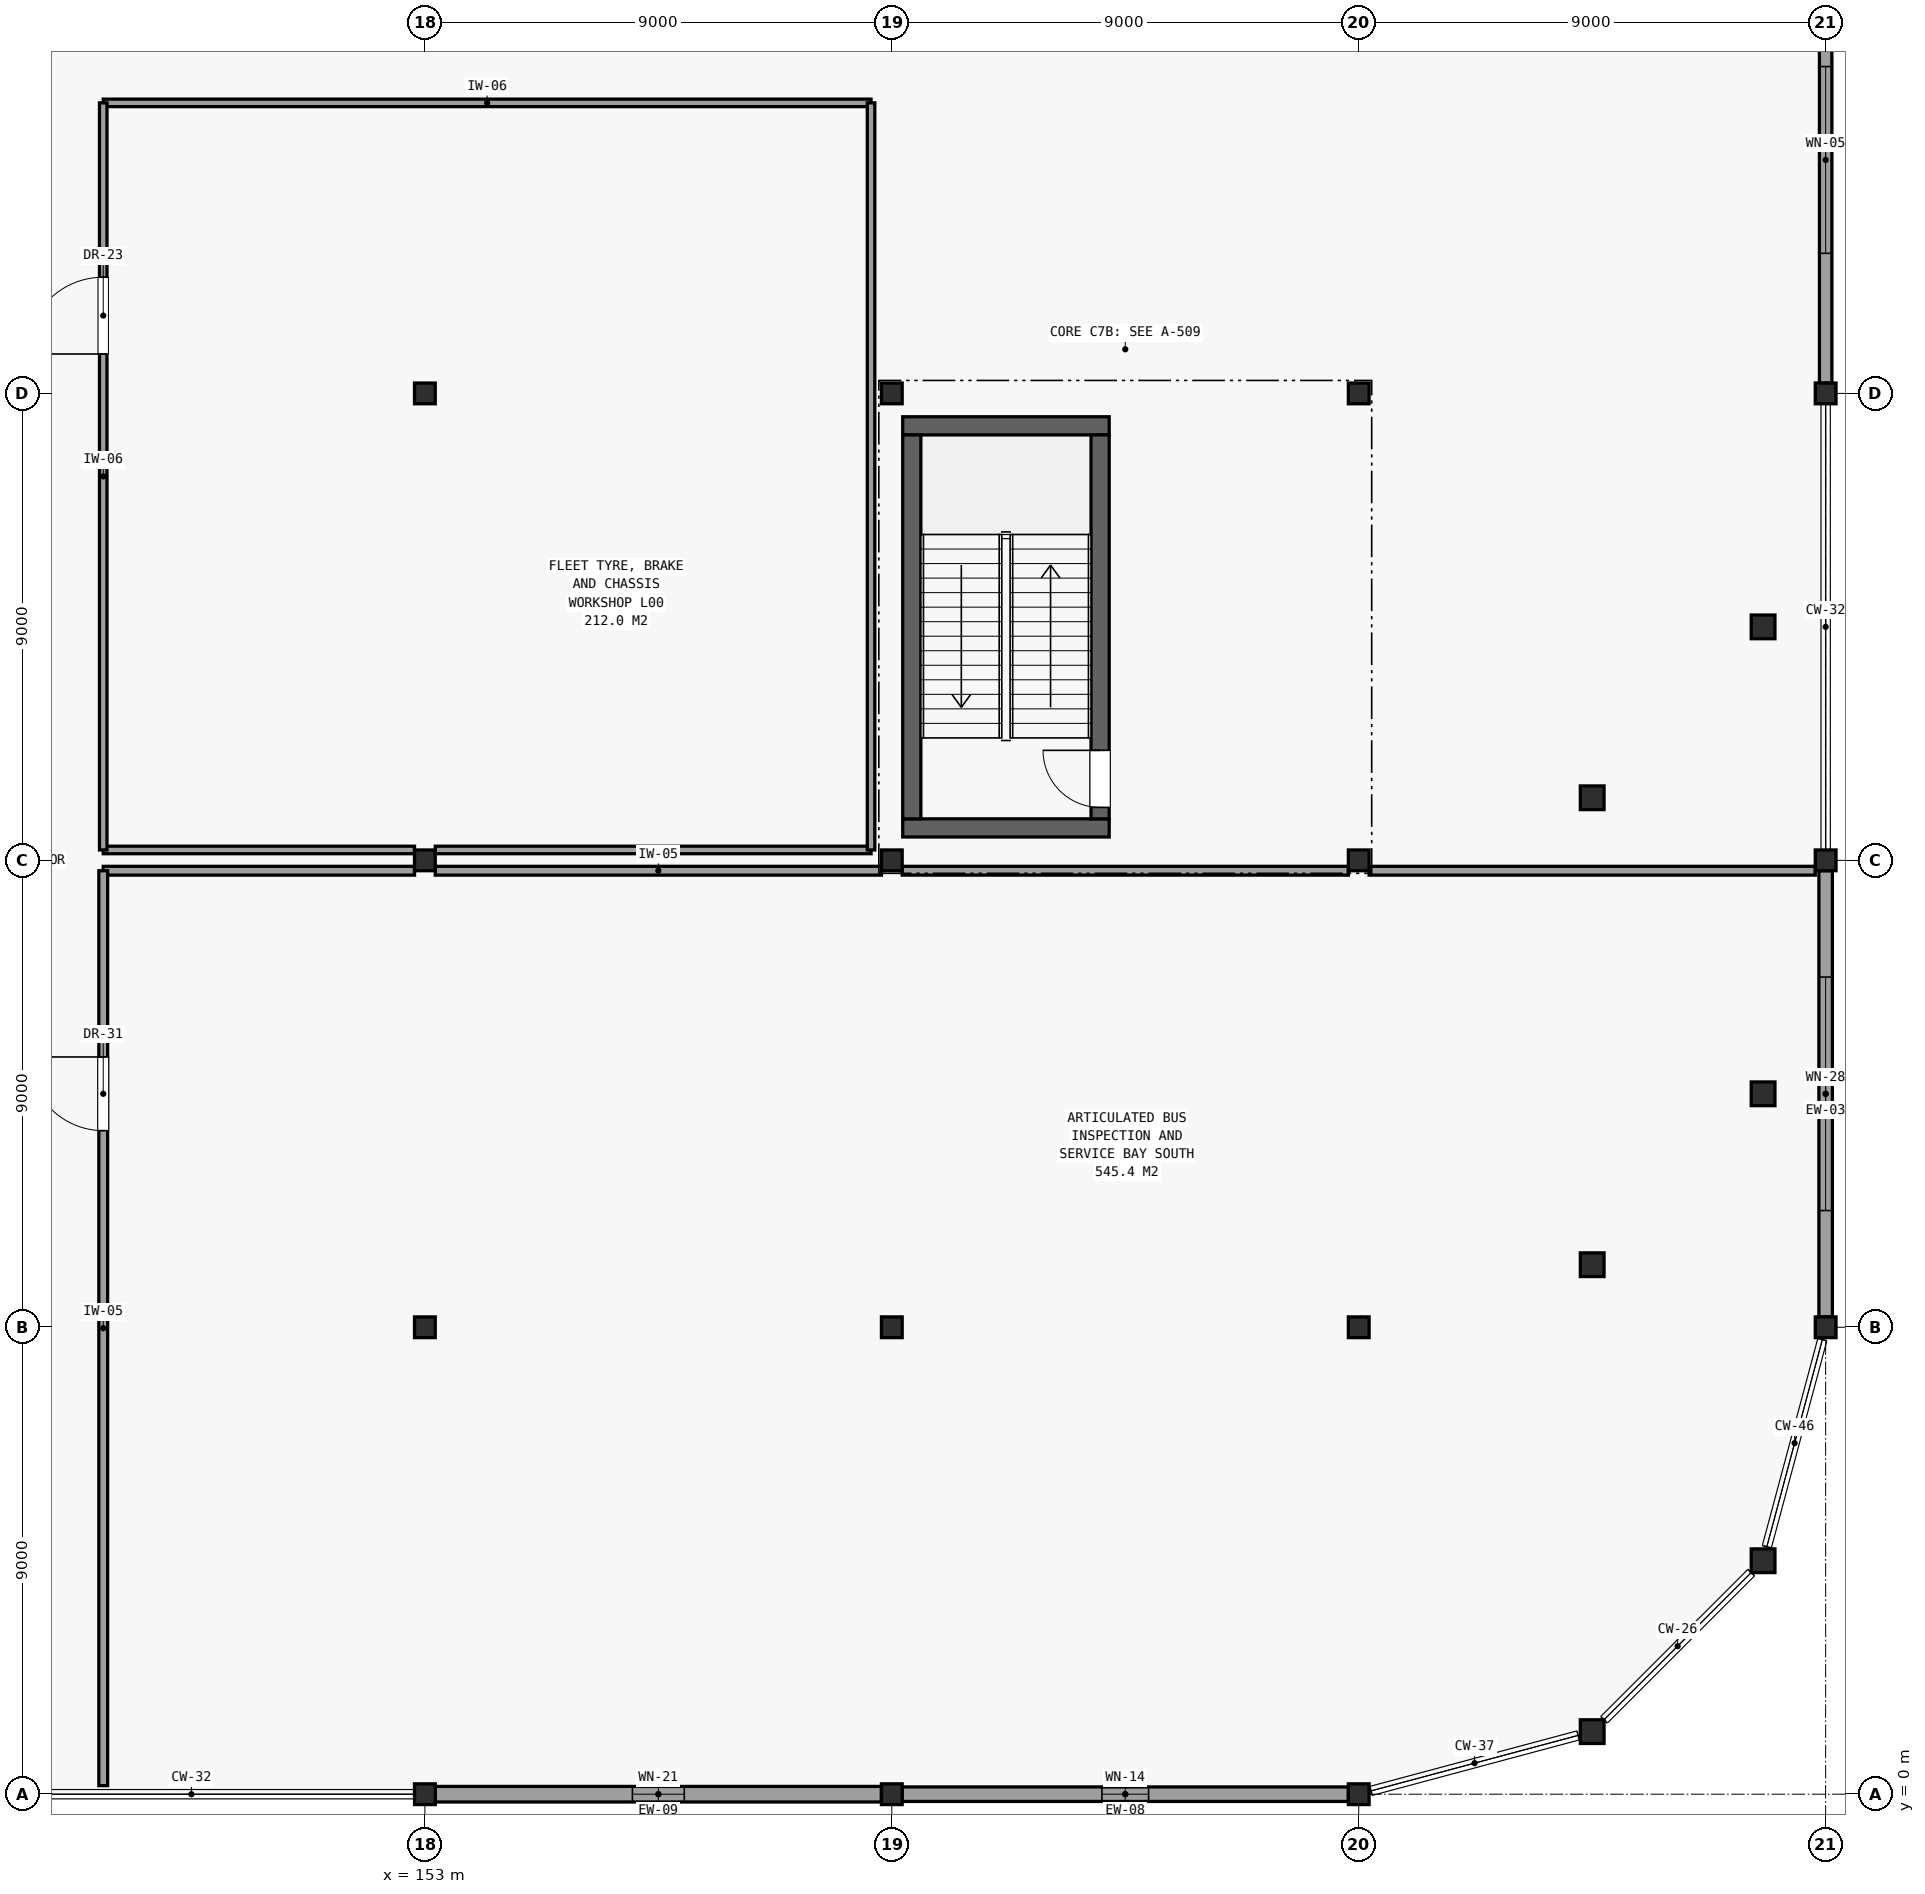
"""IFC4 building model, lengths in metres.
Left out: names, types, materials, properties, quantities, classifications, styles, units other than length and angle.
Written with IfcOpenShell. Run it as: python <this file> out.ifc"""

import sys

from ifc_helpers import new_model, si_unit, direction, frame, frame_2d, origin, origin_2d, place, context, subcontext, project, spatial, rectangle, hollow_rectangle, hollow_circle, extrude, element, fill, save


model = new_model("IFC4")
c1 = context("Model", 3, precision=1e-05, world=origin(), true_north=direction((0.0, 1.0)))
c2 = subcontext(c1, "Body", "Model", "MODEL_VIEW")
j1 = project(units=[si_unit("LENGTHUNIT", "METRE"), si_unit("PLANEANGLEUNIT", "RADIAN")], contexts=[c1])
p1 = place(None, origin())
s1 = spatial("IfcSite", under=j1, at=p1, CompositionType="ELEMENT")
p2 = place(p1, origin())
s2 = spatial("IfcBuilding", under=s1, at=p2, CompositionType="ELEMENT")
p3 = place(p2, origin())
s3 = spatial("IfcBuildingStorey", under=s2, at=p3, CompositionType="ELEMENT", Elevation=0.0)
for number, where, z_axis, x_axis in (
    (1, (153.0, 0.0, 0.0), (0.0, 0.0, 1.0), (1.0, 0.0, 0.0)),
    (2, (153.0, 9.0, 0.0), (0.0, 0.0, 1.0), (1.0, 0.0, 0.0)),
    (3, (153.0, 18.0, 0.0), (0.0, 0.0, 1.0), (1.0, 0.0, 0.0)),
    (4, (153.0, 27.0, 0.0), (0.0, 0.0, 1.0), (1.0, 0.0, 0.0)),
    (5, (162.0, 0.0, 0.0), (0.0, 0.0, 1.0), (1.0, 0.0, 0.0)),
    (6, (162.0, 9.0, 0.0), (0.0, 0.0, 1.0), (1.0, 0.0, 0.0)),
    (7, (162.0, 18.0, 0.0), (0.0, 0.0, 1.0), (1.0, 0.0, 0.0)),
    (8, (162.0, 27.0, 0.0), (0.0, 0.0, 1.0), (1.0, 0.0, 0.0)),
    (9, (171.0, 0.0, 0.0), (0.0, 0.0, 1.0), (1.0, 0.0, 0.0)),
    (10, (171.0, 9.0, 0.0), (0.0, 0.0, 1.0), (1.0, 0.0, 0.0)),
    (11, (171.0, 18.0, 0.0), (0.0, 0.0, 1.0), (1.0, 0.0, 0.0)),
    (12, (171.0, 27.0, 0.0), (0.0, 0.0, 1.0), (1.0, 0.0, 0.0)),
):
    element("IfcColumn", number, at=place(p3, frame(where, z_axis=z_axis, x_axis=x_axis)), inside=s3, PredefinedType="COLUMN", context=c2, shape_type="SweptSolid", body=[
        extrude(hollow_rectangle(XDim=0.4, YDim=0.4, WallThickness=0.019, at=origin_2d()), origin(), (0.0, 0.0, 1.0), 5.1),
    ])
for number, where, z_axis, x_axis in (
    (13, (175.5, 1.206, 0.0), (0.0, 0.0, 1.0), (1.0, 0.0, 0.0)),
    (14, (175.5, 10.206, 0.0), (0.0, 0.0, 1.0), (1.0, 0.0, 0.0)),
    (15, (175.5, 19.206, 0.0), (0.0, 0.0, 1.0), (1.0, 0.0, 0.0)),
    (16, (178.794, 4.5, 0.0), (0.0, 0.0, 1.0), (1.0, 0.0, 0.0)),
    (17, (178.794, 13.5, 0.0), (0.0, 0.0, 1.0), (1.0, 0.0, 0.0)),
    (18, (178.794, 22.5, 0.0), (0.0, 0.0, 1.0), (1.0, 0.0, 0.0)),
):
    element("IfcColumn", number, at=place(p3, frame(where, z_axis=z_axis, x_axis=x_axis)), inside=s3, PredefinedType="COLUMN", context=c2, shape_type="SweptSolid", body=[
        extrude(hollow_circle(Radius=0.229, WallThickness=0.016, at=origin_2d()), origin(), (0.0, 0.0, 1.0), 5.1),
    ])
for number, where, z_axis, x_axis in (
    (19, (180.0, 9.0, 0.0), (0.0, 0.0, 1.0), (1.0, 0.0, 0.0)),
    (20, (180.0, 18.0, 0.0), (0.0, 0.0, 1.0), (1.0, 0.0, 0.0)),
    (21, (180.0, 27.0, 0.0), (0.0, 0.0, 1.0), (1.0, 0.0, 0.0)),
):
    element("IfcColumn", number, at=place(p3, frame(where, z_axis=z_axis, x_axis=x_axis)), inside=s3, PredefinedType="COLUMN", context=c2, shape_type="SweptSolid", body=[
        extrude(hollow_rectangle(XDim=0.4, YDim=0.4, WallThickness=0.019, at=origin_2d()), origin(), (0.0, 0.0, 1.0), 5.1),
    ])
p4 = place(p3, frame((153.2, 0.0, 0.0), z_axis=(0.0, 0.0, 1.0), x_axis=(1.0, 0.0, 0.0)))
e22 = element("IfcWall", 22, at=p4, inside=s3, PredefinedType="SOLIDWALL", context=c2, shape_type="SweptSolid", body=[
    extrude(rectangle(XDim=8.6, YDim=0.3, at=frame_2d((4.3, 0.0))), origin(), (0.0, 0.0, 1.0), 4.19),
])
p5 = place(p4, frame((3.8, 0.0, 0.95)))
e23 = element("IfcOpeningElement", 23, at=p5, cuts=e22, PredefinedType="OPENING", context=c2, shape_type="SweptSolid", body=[
    extrude(rectangle(XDim=1.0, YDim=1.4, at=frame_2d((0.5, 0.7))), frame((0.0, 0.161, 0.0), z_axis=(0.0, -1.0, 0.0), x_axis=(1.0, 0.0, 0.0)), (0.0, 0.0, 1.0), 0.322),
])
p6 = place(p3, frame((162.2, 0.0, 0.0), z_axis=(0.0, 0.0, 1.0), x_axis=(1.0, 0.0, 0.0)))
e24 = element("IfcWall", 24, at=p6, inside=s3, PredefinedType="SOLIDWALL", context=c2, shape_type="SweptSolid", body=[
    extrude(rectangle(XDim=8.6, YDim=0.28, at=frame_2d((4.3, 0.0))), origin(), (0.0, 0.0, 1.0), 4.19),
])
p7 = place(p6, frame((3.85, 0.0, 0.95)))
e25 = element("IfcOpeningElement", 25, at=p7, cuts=e24, PredefinedType="OPENING", context=c2, shape_type="SweptSolid", body=[
    extrude(rectangle(XDim=0.9, YDim=1.3, at=frame_2d((0.45, 0.65))), frame((0.0, 0.151, 0.0), z_axis=(0.0, -1.0, 0.0), x_axis=(1.0, 0.0, 0.0)), (0.0, 0.0, 1.0), 0.302),
])
p8 = place(p3, frame((180.0, 9.2, 0.0), z_axis=(0.0, 0.0, 1.0), x_axis=(0.0, 1.0, 0.0)))
e26 = element("IfcWall", 26, at=p8, inside=s3, PredefinedType="SOLIDWALL", context=c2, shape_type="SweptSolid", body=[
    extrude(rectangle(XDim=8.6, YDim=0.26, at=frame_2d((4.3, 0.0))), origin(), (0.0, 0.0, 1.0), 4.19),
])
p9 = place(p8, frame((2.05, 0.0, 0.95)))
e27 = element("IfcOpeningElement", 27, at=p9, cuts=e26, PredefinedType="OPENING", context=c2, shape_type="SweptSolid", body=[
    extrude(rectangle(XDim=4.5, YDim=1.2, at=frame_2d((2.25, 0.6))), frame((0.0, 0.141, 0.0), z_axis=(0.0, -1.0, 0.0), x_axis=(1.0, 0.0, 0.0)), (0.0, 0.0, 1.0), 0.282),
])
p10 = place(p3, frame((180.0, 27.2, 0.0), z_axis=(0.0, 0.0, 1.0), x_axis=(0.0, 1.0, 0.0)))
e28 = element("IfcWall", 28, at=p10, inside=s3, PredefinedType="SOLIDWALL", context=c2, shape_type="SweptSolid", body=[
    extrude(rectangle(XDim=8.6, YDim=0.24, at=frame_2d((4.3, 0.0))), origin(), (0.0, 0.0, 1.0), 4.19),
])
p11 = place(p10, frame((2.5, 0.0, 0.95)))
e29 = element("IfcOpeningElement", 29, at=p11, cuts=e28, PredefinedType="OPENING", context=c2, shape_type="SweptSolid", body=[
    extrude(rectangle(XDim=3.6, YDim=1.1, at=frame_2d((1.8, 0.55))), frame((0.0, 0.131, 0.0), z_axis=(0.0, -1.0, 0.0), x_axis=(1.0, 0.0, 0.0)), (0.0, 0.0, 1.0), 0.262),
])
for number, where, z_axis, x_axis in (
    (30, (162.21, 18.625, 0.0), (0.0, 0.0, 1.0), (1.0, 0.0, 0.0)),
    (31, (162.21, 26.375, 0.0), (0.0, 0.0, 1.0), (1.0, 0.0, 0.0)),
):
    element("IfcWall", number, at=place(p3, frame(where, z_axis=z_axis, x_axis=x_axis)), inside=s3, PredefinedType="SHEAR", context=c2, shape_type="SweptSolid", body=[
        extrude(rectangle(XDim=3.98, YDim=0.35, at=frame_2d((1.99, 0.0))), origin(), (0.0, 0.0, 1.0), 4.84),
    ])
p12 = place(p3, frame((162.385, 18.8, 0.0), z_axis=(0.0, 0.0, 1.0), x_axis=(0.0, 1.0, 0.0)))
e32 = element("IfcWall", 32, at=p12, inside=s3, PredefinedType="SHEAR", context=c2, shape_type="SweptSolid", body=[
    extrude(rectangle(XDim=7.4, YDim=0.35, at=frame_2d((3.7, 0.0))), origin(), (0.0, 0.0, 1.0), 4.84),
])
p13 = place(p3, frame((166.015, 18.8, 0.0), z_axis=(0.0, 0.0, 1.0), x_axis=(0.0, 1.0, 0.0)))
e33 = element("IfcWall", 33, at=p13, inside=s3, PredefinedType="SHEAR", context=c2, shape_type="SweptSolid", body=[
    extrude(rectangle(XDim=7.4, YDim=0.35, at=frame_2d((3.7, 0.0))), origin(), (0.0, 0.0, 1.0), 4.84),
])
p14 = place(p13, frame((0.22, 0.0, 0.0)))
e34 = element("IfcOpeningElement", 34, at=p14, cuts=e33, PredefinedType="OPENING", context=c2, shape_type="SweptSolid", body=[
    extrude(rectangle(XDim=1.1, YDim=2.15, at=frame_2d((0.55, 1.075))), frame((0.0, 0.186, 0.0), z_axis=(0.0, -1.0, 0.0), x_axis=(1.0, 0.0, 0.0)), (0.0, 0.0, 1.0), 0.372),
])
p15 = place(p3, frame((146.8, 17.8, 0.0), z_axis=(0.0, 0.0, 1.0), x_axis=(1.0, 0.0, 0.0)))
e35 = element("IfcWall", 35, at=p15, inside=s3, PredefinedType="PARTITIONING", context=c2, shape_type="SweptSolid", body=[
    extrude(rectangle(XDim=6.0, YDim=0.17, at=frame_2d((3.0, 0.0))), origin(), (0.0, 0.0, 1.0), 4.19),
])
for number, where, z_axis, x_axis in (
    (36, (153.2, 17.8, 0.0), (0.0, 0.0, 1.0), (1.0, 0.0, 0.0)),
    (37, (162.2, 17.8, 0.0), (0.0, 0.0, 1.0), (1.0, 0.0, 0.0)),
    (38, (171.2, 17.8, 0.0), (0.0, 0.0, 1.0), (1.0, 0.0, 0.0)),
):
    element("IfcWall", number, at=place(p3, frame(where, z_axis=z_axis, x_axis=x_axis)), inside=s3, PredefinedType="PARTITIONING", context=c2, shape_type="SweptSolid", body=[
        extrude(rectangle(XDim=8.6, YDim=0.17, at=frame_2d((4.3, 0.0))), origin(), (0.0, 0.0, 1.0), 4.19),
    ])
p16 = place(p3, frame((146.8, 0.165, 0.0), z_axis=(0.0, 0.0, 1.0), x_axis=(0.0, 1.0, 0.0)))
e39 = element("IfcWall", 39, at=p16, inside=s3, PredefinedType="PARTITIONING", context=c2, shape_type="SweptSolid", body=[
    extrude(rectangle(XDim=17.635, YDim=0.17, at=frame_2d((8.817, 0.0))), origin(), (0.0, 0.0, 1.0), 4.24),
])
p17 = place(p16, frame((12.625, 0.0, 0.0)))
e40 = element("IfcOpeningElement", 40, at=p17, cuts=e39, PredefinedType="OPENING", context=c2, shape_type="SweptSolid", body=[
    extrude(rectangle(XDim=1.42, YDim=2.3, at=frame_2d((0.71, 1.15))), frame((0.0, 0.096, 0.0), z_axis=(0.0, -1.0, 0.0), x_axis=(1.0, 0.0, 0.0)), (0.0, 0.0, 1.0), 0.192),
])
p18 = place(p3, frame((146.8, 18.2, 0.0), z_axis=(0.0, 0.0, 1.0), x_axis=(1.0, 0.0, 0.0)))
e41 = element("IfcWall", 41, at=p18, inside=s3, PredefinedType="PARTITIONING", context=c2, shape_type="SweptSolid", body=[
    extrude(rectangle(XDim=6.0, YDim=0.145, at=frame_2d((3.0, 0.0))), origin(), (0.0, 0.0, 1.0), 4.19),
])
p19 = place(p3, frame((153.2, 18.2, 0.0), z_axis=(0.0, 0.0, 1.0), x_axis=(1.0, 0.0, 0.0)))
e42 = element("IfcWall", 42, at=p19, inside=s3, PredefinedType="PARTITIONING", context=c2, shape_type="SweptSolid", body=[
    extrude(rectangle(XDim=8.4, YDim=0.145, at=frame_2d((4.2, 0.0))), origin(), (0.0, 0.0, 1.0), 4.19),
])
p20 = place(p3, frame((146.8, 32.6, 0.0), z_axis=(0.0, 0.0, 1.0), x_axis=(1.0, 0.0, 0.0)))
e43 = element("IfcWall", 43, at=p20, inside=s3, PredefinedType="PARTITIONING", context=c2, shape_type="SweptSolid", body=[
    extrude(rectangle(XDim=14.8, YDim=0.145, at=frame_2d((7.4, 0.0))), origin(), (0.0, 0.0, 1.0), 4.19),
])
p21 = place(p3, frame((146.8, 18.2, 0.0), z_axis=(0.0, 0.0, 1.0), x_axis=(0.0, 1.0, 0.0)))
e44 = element("IfcWall", 44, at=p21, inside=s3, PredefinedType="PARTITIONING", context=c2, shape_type="SweptSolid", body=[
    extrude(rectangle(XDim=14.4, YDim=0.145, at=frame_2d((7.2, 0.0))), origin(), (0.0, 0.0, 1.0), 4.24),
])
p22 = place(p21, frame((9.56, 0.0, 0.0)))
e45 = element("IfcOpeningElement", 45, at=p22, cuts=e44, PredefinedType="OPENING", context=c2, shape_type="SweptSolid", body=[
    extrude(rectangle(XDim=1.48, YDim=2.35, at=frame_2d((0.74, 1.175))), frame((0.0, 0.083, 0.0), z_axis=(0.0, -1.0, 0.0), x_axis=(1.0, 0.0, 0.0)), (0.0, 0.0, 1.0), 0.167),
])
p23 = place(p3, frame((161.6, 18.2, 0.0), z_axis=(0.0, 0.0, 1.0), x_axis=(0.0, 1.0, 0.0)))
e46 = element("IfcWall", 46, at=p23, inside=s3, PredefinedType="PARTITIONING", context=c2, shape_type="SweptSolid", body=[
    extrude(rectangle(XDim=14.4, YDim=0.145, at=frame_2d((7.2, 0.0))), origin(), (0.0, 0.0, 1.0), 4.24),
])
p24 = place(p5, origin())
e47 = element("IfcWindow", 47, at=p24, inside=s3, PartitioningType="SINGLE_PANEL", PredefinedType="WINDOW", context=c2, shape_type="SweptSolid", body=[
    extrude(rectangle(XDim=1.0, YDim=1.4, at=frame_2d((0.5, 0.7))), frame((0.0, 0.03, 0.0), z_axis=(0.0, -1.0, 0.0), x_axis=(1.0, 0.0, 0.0)), (0.0, 0.0, 1.0), 0.06),
])
fill(e23, e47)
p25 = place(p7, origin())
e48 = element("IfcWindow", 48, at=p25, inside=s3, PartitioningType="SINGLE_PANEL", PredefinedType="WINDOW", context=c2, shape_type="SweptSolid", body=[
    extrude(rectangle(XDim=0.9, YDim=1.3, at=frame_2d((0.45, 0.65))), frame((0.0, 0.03, 0.0), z_axis=(0.0, -1.0, 0.0), x_axis=(1.0, 0.0, 0.0)), (0.0, 0.0, 1.0), 0.06),
])
fill(e25, e48)
p26 = place(p9, origin())
e49 = element("IfcWindow", 49, at=p26, inside=s3, PartitioningType="SINGLE_PANEL", PredefinedType="WINDOW", context=c2, shape_type="SweptSolid", body=[
    extrude(rectangle(XDim=4.5, YDim=1.2, at=frame_2d((2.25, 0.6))), frame((0.0, 0.03, 0.0), z_axis=(0.0, -1.0, 0.0), x_axis=(1.0, 0.0, 0.0)), (0.0, 0.0, 1.0), 0.06),
])
fill(e27, e49)
p27 = place(p11, origin())
e50 = element("IfcWindow", 50, at=p27, inside=s3, PartitioningType="SINGLE_PANEL", PredefinedType="WINDOW", context=c2, shape_type="SweptSolid", body=[
    extrude(rectangle(XDim=3.6, YDim=1.1, at=frame_2d((1.8, 0.55))), frame((0.0, 0.03, 0.0), z_axis=(0.0, -1.0, 0.0), x_axis=(1.0, 0.0, 0.0)), (0.0, 0.0, 1.0), 0.06),
])
fill(e29, e50)
p28 = place(p14, origin())
e51 = element("IfcDoor", 51, at=p28, inside=s3, OperationType="SINGLE_SWING_RIGHT", PredefinedType="DOOR", context=c2, shape_type="SweptSolid", body=[
    extrude(rectangle(XDim=1.1, YDim=2.15, at=frame_2d((0.55, 1.075))), frame((0.0, 0.025, 0.0), z_axis=(0.0, -1.0, 0.0), x_axis=(1.0, 0.0, 0.0)), (0.0, 0.0, 1.0), 0.05),
])
fill(e34, e51)
p29 = place(p17, origin())
e52 = element("IfcDoor", 52, at=p29, inside=s3, OperationType="SINGLE_SWING_RIGHT", PredefinedType="DOOR", context=c2, shape_type="SweptSolid", body=[
    extrude(rectangle(XDim=1.42, YDim=2.3, at=frame_2d((0.71, 1.15))), frame((0.0, 0.025, 0.0), z_axis=(0.0, -1.0, 0.0), x_axis=(1.0, 0.0, 0.0)), (0.0, 0.0, 1.0), 0.05),
])
fill(e40, e52)
p30 = place(p22, origin())
e53 = element("IfcDoor", 53, at=p30, inside=s3, OperationType="SINGLE_SWING_LEFT", PredefinedType="DOOR", context=c2, shape_type="SweptSolid", body=[
    extrude(rectangle(XDim=1.48, YDim=2.35, at=frame_2d((0.74, 1.175))), frame((0.0, 0.025, 0.0), z_axis=(0.0, -1.0, 0.0), x_axis=(1.0, 0.0, 0.0)), (0.0, 0.0, 1.0), 0.05),
])
fill(e45, e53)
save(model, sys.argv[1])
